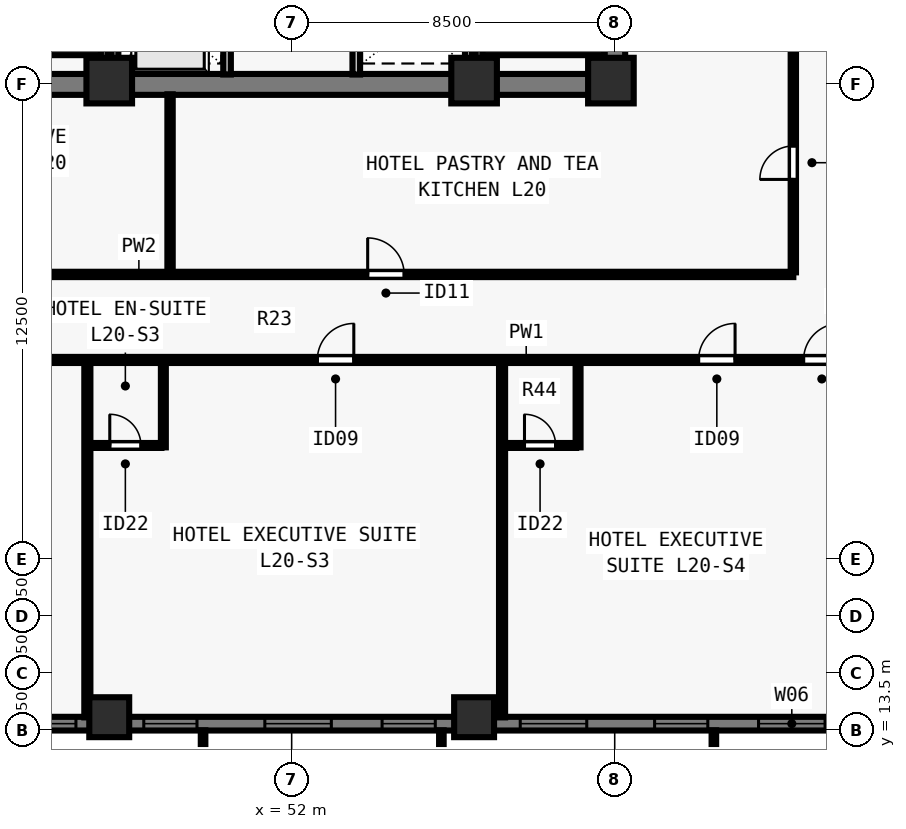
"""IFC4 building model, lengths in metres.
Left out: names, types, materials, properties, quantities, classifications, styles, units other than length and angle.
Written with IfcOpenShell. Run it as: python <this file> out.ifc"""

import sys

from ifc_helpers import new_model, si_unit, direction, frame, frame_2d, origin, origin_2d, place, context, subcontext, project, spatial, rectangle, extrude, element, fill, save


model = new_model("IFC4")
c1 = context("Model", 3, precision=1e-05, world=origin(), true_north=direction((0.0, 1.0)))
c2 = subcontext(c1, "Body", "Model", "MODEL_VIEW")
j1 = project(units=[si_unit("LENGTHUNIT", "METRE"), si_unit("PLANEANGLEUNIT", "RADIAN")], contexts=[c1])
p1 = place(None, origin())
s1 = spatial("IfcSite", under=j1, at=p1, CompositionType="ELEMENT")
p2 = place(p1, origin())
s2 = spatial("IfcBuilding", under=s1, at=p2, CompositionType="ELEMENT")
p3 = place(p2, frame((0.0, 0.0, 76.0)))
s3 = spatial("IfcBuildingStorey", under=s2, at=p3, CompositionType="ELEMENT", Elevation=76.0)
for number, where, z_axis, x_axis in (
    (1, (47.2, 30.6, 0.0), (0.0, 0.0, 1.0), (1.0, 0.0, 0.0)),
    (2, (56.8, 30.6, 0.0), (0.0, 0.0, 1.0), (1.0, 0.0, 0.0)),
    (3, (60.4, 30.6, 0.0), (0.0, 0.0, 1.0), (1.0, 0.0, 0.0)),
):
    element("IfcColumn", number, at=place(p3, frame(where, z_axis=z_axis, x_axis=x_axis)), inside=s3, PredefinedType="COLUMN", context=c2, shape_type="SweptSolid", body=[
        extrude(rectangle(XDim=1.2, YDim=1.2, at=origin_2d()), origin(), (0.0, 0.0, 1.0), 3.5),
    ])
for number, where, z_axis, x_axis in (
    (4, (47.2, 13.85, 0.0), (0.0, 0.0, 1.0), (1.0, 0.0, 0.0)),
    (5, (56.8, 13.85, 0.0), (0.0, 0.0, 1.0), (1.0, 0.0, 0.0)),
):
    element("IfcColumn", number, at=place(p3, frame(where, z_axis=z_axis, x_axis=x_axis)), inside=s3, PredefinedType="COLUMN", context=c2, shape_type="SweptSolid", body=[
        extrude(rectangle(XDim=1.05, YDim=1.05, at=origin_2d()), origin(), (0.0, 0.0, 1.0), 3.5),
    ])
p4 = place(p3, frame((74.5, 13.68, 0.0), z_axis=(0.0, 0.0, 1.0), x_axis=(-1.0, 0.0, 0.0)))
e6 = element("IfcWall", 6, at=p4, inside=s3, PredefinedType="SOLIDWALL", context=c2, shape_type="SweptSolid", body=[
    extrude(rectangle(XDim=44.662, YDim=0.36, at=frame_2d((22.331, 0.0))), origin(), (0.0, 0.0, 1.0), 3.28),
])
p5 = place(p4, frame((4.83, 0.0, 0.8)))
e7 = element("IfcOpeningElement", 7, at=p5, cuts=e6, PredefinedType="OPENING", context=c2, shape_type="SweptSolid", body=[
    extrude(rectangle(XDim=1.4, YDim=1.544, at=frame_2d((0.7, 0.772))), frame((0.0, 0.19, 0.0), z_axis=(0.0, -1.0, 0.0), x_axis=(1.0, 0.0, 0.0)), (0.0, 0.0, 1.0), 0.38),
])
p6 = place(p4, frame((8.465, 0.0, 0.8)))
e8 = element("IfcOpeningElement", 8, at=p6, cuts=e6, PredefinedType="OPENING", context=c2, shape_type="SweptSolid", body=[
    extrude(rectangle(XDim=1.75, YDim=1.544, at=frame_2d((0.875, 0.772))), frame((0.0, 0.19, 0.0), z_axis=(0.0, -1.0, 0.0), x_axis=(1.0, 0.0, 0.0)), (0.0, 0.0, 1.0), 0.38),
])
p7 = place(p4, frame((11.551, 0.0, 0.8)))
e9 = element("IfcOpeningElement", 9, at=p7, cuts=e6, PredefinedType="OPENING", context=c2, shape_type="SweptSolid", body=[
    extrude(rectangle(XDim=1.4, YDim=1.544, at=frame_2d((0.7, 0.772))), frame((0.0, 0.19, 0.0), z_axis=(0.0, -1.0, 0.0), x_axis=(1.0, 0.0, 0.0)), (0.0, 0.0, 1.0), 0.38),
])
p8 = place(p4, frame((14.736, 0.0, 0.8)))
e10 = element("IfcOpeningElement", 10, at=p8, cuts=e6, PredefinedType="OPENING", context=c2, shape_type="SweptSolid", body=[
    extrude(rectangle(XDim=1.75, YDim=1.544, at=frame_2d((0.875, 0.772))), frame((0.0, 0.19, 0.0), z_axis=(0.0, -1.0, 0.0), x_axis=(1.0, 0.0, 0.0)), (0.0, 0.0, 1.0), 0.38),
])
p9 = place(p4, frame((18.721, 0.0, 0.8)))
e11 = element("IfcOpeningElement", 11, at=p9, cuts=e6, PredefinedType="OPENING", context=c2, shape_type="SweptSolid", body=[
    extrude(rectangle(XDim=1.4, YDim=1.544, at=frame_2d((0.7, 0.772))), frame((0.0, 0.19, 0.0), z_axis=(0.0, -1.0, 0.0), x_axis=(1.0, 0.0, 0.0)), (0.0, 0.0, 1.0), 0.38),
])
p10 = place(p4, frame((21.456, 0.0, 0.8)))
e12 = element("IfcOpeningElement", 12, at=p10, cuts=e6, PredefinedType="OPENING", context=c2, shape_type="SweptSolid", body=[
    extrude(rectangle(XDim=1.75, YDim=1.544, at=frame_2d((0.875, 0.772))), frame((0.0, 0.19, 0.0), z_axis=(0.0, -1.0, 0.0), x_axis=(1.0, 0.0, 0.0)), (0.0, 0.0, 1.0), 0.38),
])
p11 = place(p4, frame((24.991, 0.0, 0.8)))
e13 = element("IfcOpeningElement", 13, at=p11, cuts=e6, PredefinedType="OPENING", context=c2, shape_type="SweptSolid", body=[
    extrude(rectangle(XDim=1.4, YDim=1.544, at=frame_2d((0.7, 0.772))), frame((0.0, 0.19, 0.0), z_axis=(0.0, -1.0, 0.0), x_axis=(1.0, 0.0, 0.0)), (0.0, 0.0, 1.0), 0.38),
])
p12 = place(p4, frame((28.177, 0.0, 0.8)))
e14 = element("IfcOpeningElement", 14, at=p12, cuts=e6, PredefinedType="OPENING", context=c2, shape_type="SweptSolid", body=[
    extrude(rectangle(XDim=1.75, YDim=1.544, at=frame_2d((0.875, 0.772))), frame((0.0, 0.19, 0.0), z_axis=(0.0, -1.0, 0.0), x_axis=(1.0, 0.0, 0.0)), (0.0, 0.0, 1.0), 0.38),
])
p13 = place(p4, frame((31.711, 0.0, 0.8)))
e15 = element("IfcOpeningElement", 15, at=p13, cuts=e6, PredefinedType="OPENING", context=c2, shape_type="SweptSolid", body=[
    extrude(rectangle(XDim=1.4, YDim=1.544, at=frame_2d((0.7, 0.772))), frame((0.0, 0.19, 0.0), z_axis=(0.0, -1.0, 0.0), x_axis=(1.0, 0.0, 0.0)), (0.0, 0.0, 1.0), 0.38),
])
p14 = place(p4, frame((34.897, 0.0, 0.8)))
e16 = element("IfcOpeningElement", 16, at=p14, cuts=e6, PredefinedType="OPENING", context=c2, shape_type="SweptSolid", body=[
    extrude(rectangle(XDim=1.75, YDim=1.544, at=frame_2d((0.875, 0.772))), frame((0.0, 0.19, 0.0), z_axis=(0.0, -1.0, 0.0), x_axis=(1.0, 0.0, 0.0)), (0.0, 0.0, 1.0), 0.38),
])
p15 = place(p4, frame((38.432, 0.0, 0.8)))
e17 = element("IfcOpeningElement", 17, at=p15, cuts=e6, PredefinedType="OPENING", context=c2, shape_type="SweptSolid", body=[
    extrude(rectangle(XDim=1.4, YDim=1.544, at=frame_2d((0.7, 0.772))), frame((0.0, 0.19, 0.0), z_axis=(0.0, -1.0, 0.0), x_axis=(1.0, 0.0, 0.0)), (0.0, 0.0, 1.0), 0.38),
])
p16 = place(p3, frame((43.225, 30.5, 0.0), z_axis=(0.0, 0.0, 1.0), x_axis=(1.0, 0.0, 0.0)))
e18 = element("IfcWall", 18, at=p16, inside=s3, PredefinedType="SHEAR", context=c2, shape_type="SweptSolid", body=[
    extrude(rectangle(XDim=17.55, YDim=0.55, at=frame_2d((8.775, 0.0))), origin(), (0.0, 0.0, 1.0), 3.28),
])
p17 = place(p3, frame((60.5, 30.765, 0.0), z_axis=(0.0, 0.0, 1.0), x_axis=(0.0, 1.0, 0.0)))
e19 = element("IfcWall", 19, at=p17, inside=s3, PredefinedType="SHEAR", context=c2, shape_type="SweptSolid", body=[
    extrude(rectangle(XDim=7.985, YDim=0.55, at=frame_2d((3.993, 0.0))), origin(), (0.0, 0.0, 1.0), 3.28),
])
p18 = place(p3, frame((50.3, 30.76, 0.0), z_axis=(0.0, 0.0, 1.0), x_axis=(0.0, 1.0, 0.0)))
e20 = element("IfcWall", 20, at=p18, inside=s3, PredefinedType="SOLIDWALL", context=c2, shape_type="SweptSolid", body=[
    extrude(rectangle(XDim=7.855, YDim=0.2, at=frame_2d((3.927, 0.0))), origin(), (0.0, 0.0, 1.0), 3.28),
])
p19 = place(p18, frame((0.79, 0.0, 0.0)))
e21 = element("IfcOpeningElement", 21, at=p19, cuts=e20, PredefinedType="OPENING", context=c2, shape_type="SweptSolid", body=[
    extrude(rectangle(XDim=1.1, YDim=2.2, at=frame_2d((0.55, 1.1))), frame((0.0, 0.11, 0.0), z_axis=(0.0, -1.0, 0.0), x_axis=(1.0, 0.0, 0.0)), (0.0, 0.0, 1.0), 0.22),
])
p20 = place(p18, frame((3.49, 0.0, 0.0)))
e22 = element("IfcOpeningElement", 22, at=p20, cuts=e20, PredefinedType="OPENING", context=c2, shape_type="SweptSolid", body=[
    extrude(rectangle(XDim=1.1, YDim=2.2, at=frame_2d((0.55, 1.1))), frame((0.0, 0.11, 0.0), z_axis=(0.0, -1.0, 0.0), x_axis=(1.0, 0.0, 0.0)), (0.0, 0.0, 1.0), 0.22),
])
p21 = place(p18, frame((6.19, 0.0, 0.0)))
e23 = element("IfcOpeningElement", 23, at=p21, cuts=e20, PredefinedType="OPENING", context=c2, shape_type="SweptSolid", body=[
    extrude(rectangle(XDim=1.1, YDim=2.2, at=frame_2d((0.55, 1.1))), frame((0.0, 0.11, 0.0), z_axis=(0.0, -1.0, 0.0), x_axis=(1.0, 0.0, 0.0)), (0.0, 0.0, 1.0), 0.22),
])
p22 = place(p3, frame((53.7, 30.76, 0.0), z_axis=(0.0, 0.0, 1.0), x_axis=(0.0, 1.0, 0.0)))
e24 = element("IfcWall", 24, at=p22, inside=s3, PredefinedType="SOLIDWALL", context=c2, shape_type="SweptSolid", body=[
    extrude(rectangle(XDim=7.855, YDim=0.2, at=frame_2d((3.927, 0.0))), origin(), (0.0, 0.0, 1.0), 3.28),
])
for number, where, z_axis, x_axis in (
    (25, (47.35, 30.76, 0.0), (0.0, 0.0, 1.0), (0.0, 1.0, 0.0)),
    (26, (56.65, 30.76, 0.0), (0.0, 0.0, 1.0), (0.0, 1.0, 0.0)),
):
    element("IfcWall", number, at=place(p3, frame(where, z_axis=z_axis, x_axis=x_axis)), inside=s3, PredefinedType="SOLIDWALL", context=c2, shape_type="SweptSolid", body=[
        extrude(rectangle(XDim=7.855, YDim=0.18, at=frame_2d((3.927, 0.0))), origin(), (0.0, 0.0, 1.0), 3.28),
    ])
p23 = place(p3, frame((36.55, 23.25, 0.0), z_axis=(0.0, 0.0, 1.0), x_axis=(1.0, 0.0, 0.0)))
e27 = element("IfcWall", 27, at=p23, inside=s3, PredefinedType="PARTITIONING", context=c2, shape_type="SweptSolid", body=[
    extrude(rectangle(XDim=30.9, YDim=0.16, at=frame_2d((15.45, 0.0))), origin(), (0.0, 0.0, 1.0), 3.28),
])
p24 = place(p23, frame((1.13, 0.0, 0.0)))
e28 = element("IfcOpeningElement", 28, at=p24, cuts=e27, PredefinedType="OPENING", context=c2, shape_type="SweptSolid", body=[
    extrude(rectangle(XDim=0.96, YDim=2.15, at=frame_2d((0.48, 1.075))), frame((0.0, 0.09, 0.0), z_axis=(0.0, -1.0, 0.0), x_axis=(1.0, 0.0, 0.0)), (0.0, 0.0, 1.0), 0.18),
])
p25 = place(p23, frame((6.093, 0.0, 0.0)))
e29 = element("IfcOpeningElement", 29, at=p25, cuts=e27, PredefinedType="OPENING", context=c2, shape_type="SweptSolid", body=[
    extrude(rectangle(XDim=0.96, YDim=2.15, at=frame_2d((0.48, 1.075))), frame((0.0, 0.09, 0.0), z_axis=(0.0, -1.0, 0.0), x_axis=(1.0, 0.0, 0.0)), (0.0, 0.0, 1.0), 0.18),
])
p26 = place(p23, frame((16.125, 0.0, 0.0)))
e30 = element("IfcOpeningElement", 30, at=p26, cuts=e27, PredefinedType="OPENING", context=c2, shape_type="SweptSolid", body=[
    extrude(rectangle(XDim=0.96, YDim=2.15, at=frame_2d((0.48, 1.075))), frame((0.0, 0.09, 0.0), z_axis=(0.0, -1.0, 0.0), x_axis=(1.0, 0.0, 0.0)), (0.0, 0.0, 1.0), 0.18),
])
p27 = place(p23, frame((26.157, 0.0, 0.0)))
e31 = element("IfcOpeningElement", 31, at=p27, cuts=e27, PredefinedType="OPENING", context=c2, shape_type="SweptSolid", body=[
    extrude(rectangle(XDim=0.96, YDim=2.15, at=frame_2d((0.48, 1.075))), frame((0.0, 0.09, 0.0), z_axis=(0.0, -1.0, 0.0), x_axis=(1.0, 0.0, 0.0)), (0.0, 0.0, 1.0), 0.18),
])
p28 = place(p23, frame((28.92, 0.0, 0.0)))
e32 = element("IfcOpeningElement", 32, at=p28, cuts=e27, PredefinedType="OPENING", context=c2, shape_type="SweptSolid", body=[
    extrude(rectangle(XDim=0.96, YDim=2.15, at=frame_2d((0.48, 1.075))), frame((0.0, 0.09, 0.0), z_axis=(0.0, -1.0, 0.0), x_axis=(1.0, 0.0, 0.0)), (0.0, 0.0, 1.0), 0.18),
])
p29 = place(p3, frame((38.8, 25.5, 0.0), z_axis=(0.0, 0.0, 1.0), x_axis=(1.0, 0.0, 0.0)))
e33 = element("IfcWall", 33, at=p29, inside=s3, PredefinedType="PARTITIONING", context=c2, shape_type="SweptSolid", body=[
    extrude(rectangle(XDim=26.4, YDim=0.14, at=frame_2d((13.2, 0.0))), origin(), (0.0, 0.0, 1.0), 3.28),
])
p30 = place(p29, frame((2.2, 0.0, 0.0)))
e34 = element("IfcOpeningElement", 34, at=p30, cuts=e33, PredefinedType="OPENING", context=c2, shape_type="SweptSolid", body=[
    extrude(rectangle(XDim=0.96, YDim=2.12, at=frame_2d((0.48, 1.06))), frame((0.0, 0.08, 0.0), z_axis=(0.0, -1.0, 0.0), x_axis=(1.0, 0.0, 0.0)), (0.0, 0.0, 1.0), 0.16),
])
p31 = place(p29, frame((15.2, 0.0, 0.0)))
e35 = element("IfcOpeningElement", 35, at=p31, cuts=e33, PredefinedType="OPENING", context=c2, shape_type="SweptSolid", body=[
    extrude(rectangle(XDim=0.96, YDim=2.12, at=frame_2d((0.48, 1.06))), frame((0.0, 0.08, 0.0), z_axis=(0.0, -1.0, 0.0), x_axis=(1.0, 0.0, 0.0)), (0.0, 0.0, 1.0), 0.16),
])
p32 = place(p3, frame((65.2, 25.555, 0.0), z_axis=(0.0, 0.0, 1.0), x_axis=(0.0, 1.0, 0.0)))
e36 = element("IfcWall", 36, at=p32, inside=s3, PredefinedType="PARTITIONING", context=c2, shape_type="SweptSolid", body=[
    extrude(rectangle(XDim=13.195, YDim=0.14, at=frame_2d((6.598, 0.0))), origin(), (0.0, 0.0, 1.0), 3.28),
])
p33 = place(p32, frame((2.445, 0.0, 0.0)))
e37 = element("IfcOpeningElement", 37, at=p33, cuts=e36, PredefinedType="OPENING", context=c2, shape_type="SweptSolid", body=[
    extrude(rectangle(XDim=0.88, YDim=2.1, at=frame_2d((0.44, 1.05))), frame((0.0, 0.08, 0.0), z_axis=(0.0, -1.0, 0.0), x_axis=(1.0, 0.0, 0.0)), (0.0, 0.0, 1.0), 0.16),
])
p34 = place(p3, frame((48.8, 25.555, 0.0), z_axis=(0.0, 0.0, 1.0), x_axis=(0.0, 1.0, 0.0)))
e38 = element("IfcWall", 38, at=p34, inside=s3, PredefinedType="PARTITIONING", context=c2, shape_type="SweptSolid", body=[
    extrude(rectangle(XDim=4.685, YDim=0.14, at=frame_2d((2.343, 0.0))), origin(), (0.0, 0.0, 1.0), 3.28),
])
p35 = place(p3, frame((46.624, 13.845, 0.0), z_axis=(0.0, 0.0, 1.0), x_axis=(0.0, 1.0, 0.0)))
e39 = element("IfcWall", 39, at=p35, inside=s3, PredefinedType="PARTITIONING", context=c2, shape_type="SweptSolid", body=[
    extrude(rectangle(XDim=9.34, YDim=0.16, at=frame_2d((4.67, 0.0))), origin(), (0.0, 0.0, 1.0), 3.28),
])
p36 = place(p3, frame((48.624, 20.95, 0.0), z_axis=(0.0, 0.0, 1.0), x_axis=(0.0, 1.0, 0.0)))
e40 = element("IfcWall", 40, at=p36, inside=s3, PredefinedType="PLUMBINGWALL", context=c2, shape_type="SweptSolid", body=[
    extrude(rectangle(XDim=2.235, YDim=0.13, at=frame_2d((1.118, 0.0))), origin(), (0.0, 0.0, 1.0), 3.28),
])
p37 = place(p3, frame((46.689, 21.0, 0.0), z_axis=(0.0, 0.0, 1.0), x_axis=(1.0, 0.0, 0.0)))
e41 = element("IfcWall", 41, at=p37, inside=s3, PredefinedType="PLUMBINGWALL", context=c2, shape_type="SweptSolid", body=[
    extrude(rectangle(XDim=1.885, YDim=0.13, at=frame_2d((0.942, 0.0))), origin(), (0.0, 0.0, 1.0), 3.28),
])
p38 = place(p37, frame((0.525, 0.0, 0.0)))
e42 = element("IfcOpeningElement", 42, at=p38, cuts=e41, PredefinedType="OPENING", context=c2, shape_type="SweptSolid", body=[
    extrude(rectangle(XDim=0.82, YDim=2.1, at=frame_2d((0.41, 1.05))), frame((0.0, 0.075, 0.0), z_axis=(0.0, -1.0, 0.0), x_axis=(1.0, 0.0, 0.0)), (0.0, 0.0, 1.0), 0.15),
])
p39 = place(p3, frame((57.536, 13.845, 0.0), z_axis=(0.0, 0.0, 1.0), x_axis=(0.0, 1.0, 0.0)))
e43 = element("IfcWall", 43, at=p39, inside=s3, PredefinedType="PARTITIONING", context=c2, shape_type="SweptSolid", body=[
    extrude(rectangle(XDim=9.34, YDim=0.16, at=frame_2d((4.67, 0.0))), origin(), (0.0, 0.0, 1.0), 3.28),
])
p40 = place(p3, frame((59.536, 20.95, 0.0), z_axis=(0.0, 0.0, 1.0), x_axis=(0.0, 1.0, 0.0)))
e44 = element("IfcWall", 44, at=p40, inside=s3, PredefinedType="PLUMBINGWALL", context=c2, shape_type="SweptSolid", body=[
    extrude(rectangle(XDim=2.235, YDim=0.13, at=frame_2d((1.118, 0.0))), origin(), (0.0, 0.0, 1.0), 3.28),
])
p41 = place(p3, frame((57.601, 21.0, 0.0), z_axis=(0.0, 0.0, 1.0), x_axis=(1.0, 0.0, 0.0)))
e45 = element("IfcWall", 45, at=p41, inside=s3, PredefinedType="PLUMBINGWALL", context=c2, shape_type="SweptSolid", body=[
    extrude(rectangle(XDim=1.885, YDim=0.13, at=frame_2d((0.942, 0.0))), origin(), (0.0, 0.0, 1.0), 3.28),
])
p42 = place(p41, frame((0.525, 0.0, 0.0)))
e46 = element("IfcOpeningElement", 46, at=p42, cuts=e45, PredefinedType="OPENING", context=c2, shape_type="SweptSolid", body=[
    extrude(rectangle(XDim=0.82, YDim=2.1, at=frame_2d((0.41, 1.05))), frame((0.0, 0.075, 0.0), z_axis=(0.0, -1.0, 0.0), x_axis=(1.0, 0.0, 0.0)), (0.0, 0.0, 1.0), 0.15),
])
p43 = place(p3, frame((43.765, 31.36, 0.0), z_axis=(0.0, 0.0, 1.0), x_axis=(1.0, 0.0, 0.0)))
e47 = element("IfcWall", 47, at=p43, inside=s3, PredefinedType="SOLIDWALL", context=c2, shape_type="SweptSolid", body=[
    extrude(rectangle(XDim=3.23, YDim=0.18, at=frame_2d((1.615, 0.0))), origin(), (0.0, 0.0, 1.0), 3.28),
])
p44 = place(p3, frame((47.07, 38.78, 0.0), z_axis=(0.0, 0.0, 1.0), x_axis=(0.0, -1.0, 0.0)))
e48 = element("IfcWall", 48, at=p44, inside=s3, PredefinedType="SOLIDWALL", context=c2, shape_type="SweptSolid", body=[
    extrude(rectangle(XDim=8.017, YDim=0.18, at=frame_2d((4.009, 0.0))), origin(), (0.0, 0.0, 1.0), 3.28),
])
p45 = place(p3, frame((57.005, 31.36, 0.0), z_axis=(0.0, 0.0, 1.0), x_axis=(1.0, 0.0, 0.0)))
e49 = element("IfcWall", 49, at=p45, inside=s3, PredefinedType="SOLIDWALL", context=c2, shape_type="SweptSolid", body=[
    extrude(rectangle(XDim=3.23, YDim=0.18, at=frame_2d((1.615, 0.0))), origin(), (0.0, 0.0, 1.0), 3.28),
])
p46 = place(p3, frame((56.93, 38.78, 0.0), z_axis=(0.0, 0.0, 1.0), x_axis=(0.0, -1.0, 0.0)))
e50 = element("IfcWall", 50, at=p46, inside=s3, PredefinedType="SOLIDWALL", context=c2, shape_type="SweptSolid", body=[
    extrude(rectangle(XDim=8.017, YDim=0.18, at=frame_2d((4.009, 0.0))), origin(), (0.0, 0.0, 1.0), 3.28),
])
p47 = place(p6, origin())
e51 = element("IfcWindow", 51, at=p47, inside=s3, PartitioningType="SINGLE_PANEL", PredefinedType="WINDOW", context=c2, shape_type="SweptSolid", body=[
    extrude(rectangle(XDim=1.75, YDim=1.544, at=frame_2d((0.875, 0.772))), frame((0.0, -0.05, 0.0), z_axis=(0.0, -1.0, 0.0), x_axis=(1.0, 0.0, 0.0)), (0.0, 0.0, 1.0), 0.06),
])
fill(e8, e51)
p48 = place(p7, origin())
e52 = element("IfcWindow", 52, at=p48, inside=s3, PartitioningType="SINGLE_PANEL", PredefinedType="WINDOW", context=c2, shape_type="SweptSolid", body=[
    extrude(rectangle(XDim=1.4, YDim=1.544, at=frame_2d((0.7, 0.772))), frame((0.0, -0.05, 0.0), z_axis=(0.0, -1.0, 0.0), x_axis=(1.0, 0.0, 0.0)), (0.0, 0.0, 1.0), 0.06),
])
fill(e9, e52)
p49 = place(p8, origin())
e53 = element("IfcWindow", 53, at=p49, inside=s3, PartitioningType="SINGLE_PANEL", PredefinedType="WINDOW", context=c2, shape_type="SweptSolid", body=[
    extrude(rectangle(XDim=1.75, YDim=1.544, at=frame_2d((0.875, 0.772))), frame((0.0, -0.05, 0.0), z_axis=(0.0, -1.0, 0.0), x_axis=(1.0, 0.0, 0.0)), (0.0, 0.0, 1.0), 0.06),
])
fill(e10, e53)
p50 = place(p9, origin())
e54 = element("IfcWindow", 54, at=p50, inside=s3, PartitioningType="SINGLE_PANEL", PredefinedType="WINDOW", context=c2, shape_type="SweptSolid", body=[
    extrude(rectangle(XDim=1.4, YDim=1.544, at=frame_2d((0.7, 0.772))), frame((0.0, -0.05, 0.0), z_axis=(0.0, -1.0, 0.0), x_axis=(1.0, 0.0, 0.0)), (0.0, 0.0, 1.0), 0.06),
])
fill(e11, e54)
p51 = place(p10, origin())
e55 = element("IfcWindow", 55, at=p51, inside=s3, PartitioningType="SINGLE_PANEL", PredefinedType="WINDOW", context=c2, shape_type="SweptSolid", body=[
    extrude(rectangle(XDim=1.75, YDim=1.544, at=frame_2d((0.875, 0.772))), frame((0.0, -0.05, 0.0), z_axis=(0.0, -1.0, 0.0), x_axis=(1.0, 0.0, 0.0)), (0.0, 0.0, 1.0), 0.06),
])
fill(e12, e55)
p52 = place(p11, origin())
e56 = element("IfcWindow", 56, at=p52, inside=s3, PartitioningType="SINGLE_PANEL", PredefinedType="WINDOW", context=c2, shape_type="SweptSolid", body=[
    extrude(rectangle(XDim=1.4, YDim=1.544, at=frame_2d((0.7, 0.772))), frame((0.0, -0.05, 0.0), z_axis=(0.0, -1.0, 0.0), x_axis=(1.0, 0.0, 0.0)), (0.0, 0.0, 1.0), 0.06),
])
fill(e13, e56)
p53 = place(p12, origin())
e57 = element("IfcWindow", 57, at=p53, inside=s3, PartitioningType="SINGLE_PANEL", PredefinedType="WINDOW", context=c2, shape_type="SweptSolid", body=[
    extrude(rectangle(XDim=1.75, YDim=1.544, at=frame_2d((0.875, 0.772))), frame((0.0, -0.05, 0.0), z_axis=(0.0, -1.0, 0.0), x_axis=(1.0, 0.0, 0.0)), (0.0, 0.0, 1.0), 0.06),
])
fill(e14, e57)
p54 = place(p31, origin())
e58 = element("IfcDoor", 58, at=p54, inside=s3, OperationType="SINGLE_SWING_LEFT", PredefinedType="DOOR", context=c2, shape_type="SweptSolid", body=[
    extrude(rectangle(XDim=0.96, YDim=2.12, at=frame_2d((0.48, 1.06))), frame((0.0, 0.025, 0.0), z_axis=(0.0, -1.0, 0.0), x_axis=(1.0, 0.0, 0.0)), (0.0, 0.0, 1.0), 0.05),
])
fill(e35, e58)
p55 = place(p33, origin())
e59 = element("IfcDoor", 59, at=p55, inside=s3, OperationType="SINGLE_SWING_LEFT", PredefinedType="DOOR", context=c2, shape_type="SweptSolid", body=[
    extrude(rectangle(XDim=0.88, YDim=2.1, at=frame_2d((0.44, 1.05))), frame((0.0, 0.025, 0.0), z_axis=(0.0, -1.0, 0.0), x_axis=(1.0, 0.0, 0.0)), (0.0, 0.0, 1.0), 0.05),
])
fill(e37, e59)
p56 = place(p38, origin())
e60 = element("IfcDoor", 60, at=p56, inside=s3, OperationType="SINGLE_SWING_LEFT", PredefinedType="DOOR", context=c2, shape_type="SweptSolid", body=[
    extrude(rectangle(XDim=0.82, YDim=2.1, at=frame_2d((0.41, 1.05))), frame((0.0, 0.025, 0.0), z_axis=(0.0, -1.0, 0.0), x_axis=(1.0, 0.0, 0.0)), (0.0, 0.0, 1.0), 0.05),
])
fill(e42, e60)
p57 = place(p26, origin())
e61 = element("IfcDoor", 61, at=p57, inside=s3, OperationType="SINGLE_SWING_RIGHT", PredefinedType="DOOR", context=c2, shape_type="SweptSolid", body=[
    extrude(rectangle(XDim=0.96, YDim=2.15, at=frame_2d((0.48, 1.075))), frame((0.0, 0.025, 0.0), z_axis=(0.0, -1.0, 0.0), x_axis=(1.0, 0.0, 0.0)), (0.0, 0.0, 1.0), 0.05),
])
fill(e30, e61)
p58 = place(p42, origin())
e62 = element("IfcDoor", 62, at=p58, inside=s3, OperationType="SINGLE_SWING_LEFT", PredefinedType="DOOR", context=c2, shape_type="SweptSolid", body=[
    extrude(rectangle(XDim=0.82, YDim=2.1, at=frame_2d((0.41, 1.05))), frame((0.0, 0.025, 0.0), z_axis=(0.0, -1.0, 0.0), x_axis=(1.0, 0.0, 0.0)), (0.0, 0.0, 1.0), 0.05),
])
fill(e46, e62)
p59 = place(p27, origin())
e63 = element("IfcDoor", 63, at=p59, inside=s3, OperationType="SINGLE_SWING_RIGHT", PredefinedType="DOOR", context=c2, shape_type="SweptSolid", body=[
    extrude(rectangle(XDim=0.96, YDim=2.15, at=frame_2d((0.48, 1.075))), frame((0.0, 0.025, 0.0), z_axis=(0.0, -1.0, 0.0), x_axis=(1.0, 0.0, 0.0)), (0.0, 0.0, 1.0), 0.05),
])
fill(e31, e63)
p60 = place(p28, origin())
e64 = element("IfcDoor", 64, at=p60, inside=s3, OperationType="SINGLE_SWING_RIGHT", PredefinedType="DOOR", context=c2, shape_type="SweptSolid", body=[
    extrude(rectangle(XDim=0.96, YDim=2.15, at=frame_2d((0.48, 1.075))), frame((0.0, 0.025, 0.0), z_axis=(0.0, -1.0, 0.0), x_axis=(1.0, 0.0, 0.0)), (0.0, 0.0, 1.0), 0.05),
])
fill(e32, e64)
save(model, sys.argv[1])
